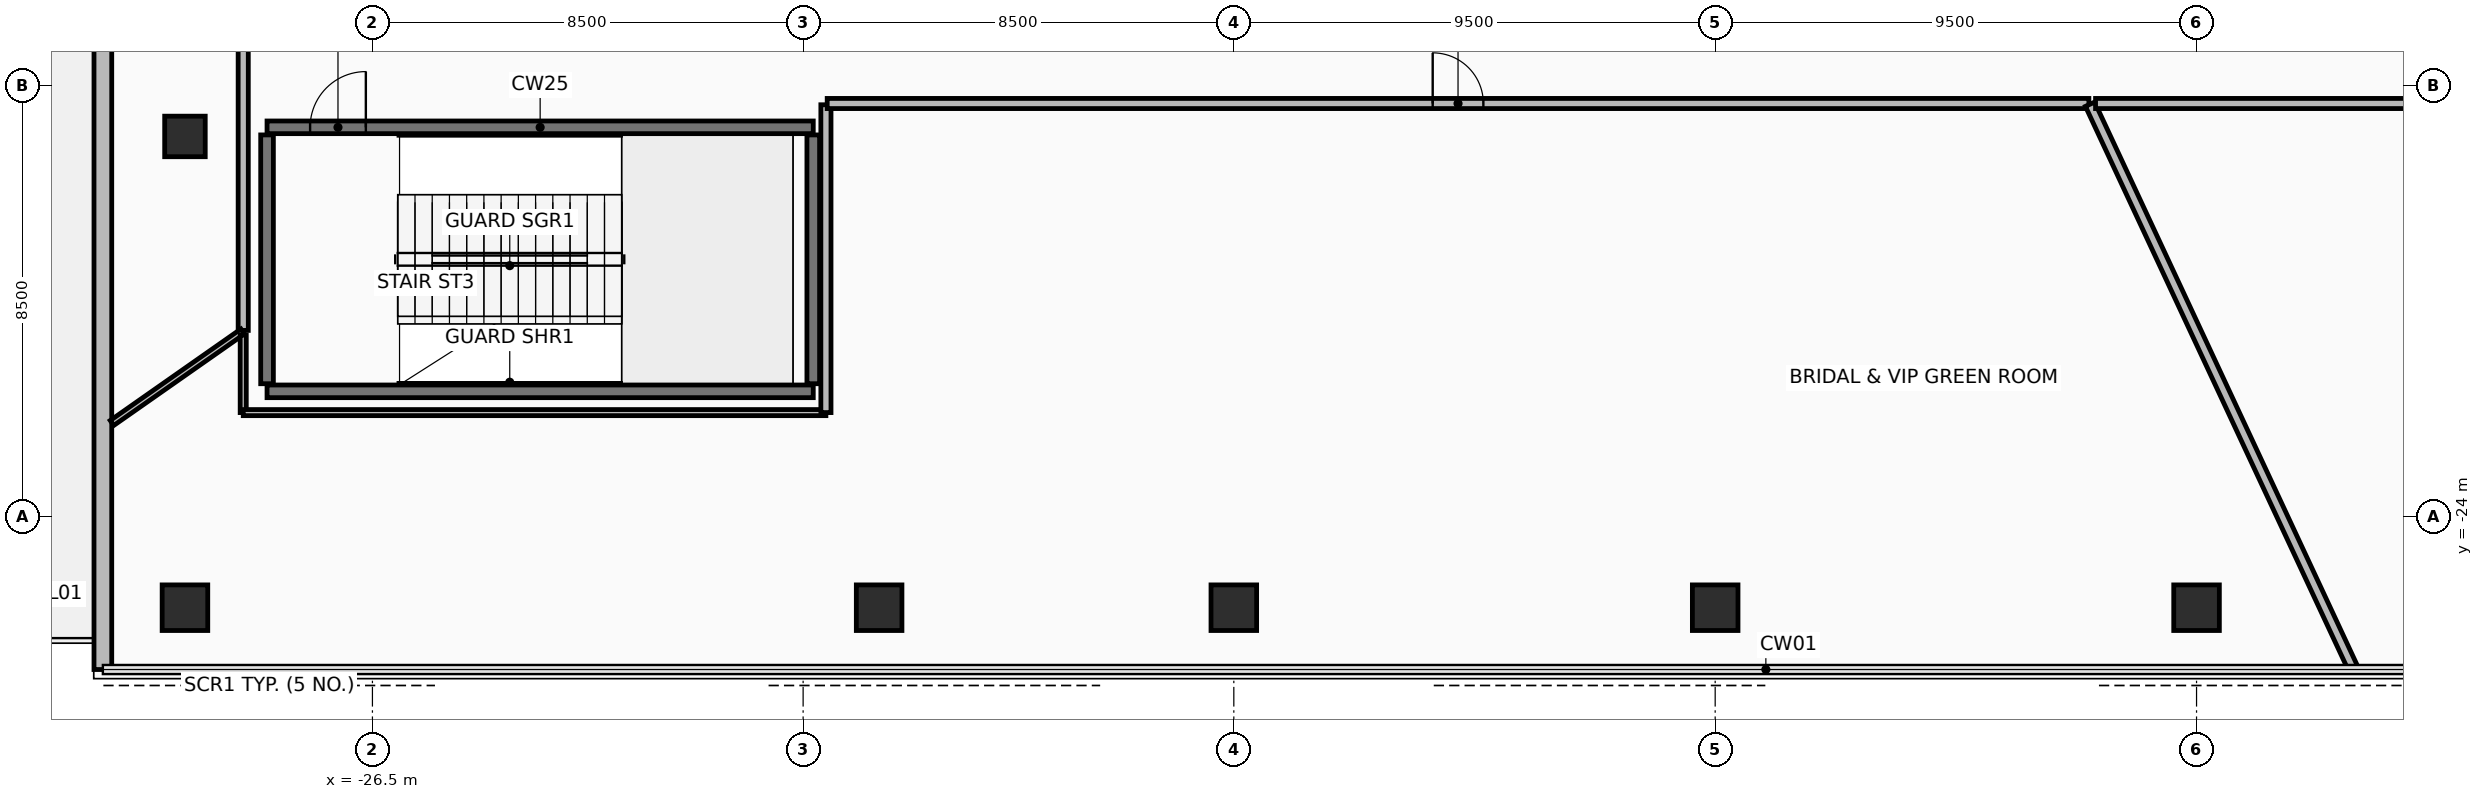
"""IFC4 building model, lengths in metres.
Left out: names, types, materials, properties, quantities, classifications, styles, units other than length and angle.
Written with IfcOpenShell. Run it as: python <this file> out.ifc"""

import sys

from ifc_helpers import new_model, si_unit, direction, frame, frame_2d, origin, origin_2d, place, context, subcontext, project, spatial, rectangle, hollow_rectangle, extrude, element, fill, save


model = new_model("IFC4")
c1 = context("Model", 3, precision=1e-05, world=origin(), true_north=direction((0.0, 1.0)))
c2 = subcontext(c1, "Body", "Model", "MODEL_VIEW")
j1 = project(units=[si_unit("LENGTHUNIT", "METRE"), si_unit("PLANEANGLEUNIT", "RADIAN")], contexts=[c1])
p1 = place(None, origin())
s1 = spatial("IfcSite", under=j1, at=p1, CompositionType="ELEMENT")
p2 = place(p1, origin())
s2 = spatial("IfcBuilding", under=s1, at=p2, CompositionType="ELEMENT")
p3 = place(p2, frame((0.0, 0.0, 16.5)))
s3 = spatial("IfcBuildingStorey", under=s2, at=p3, CompositionType="ELEMENT", Elevation=16.5)
for number, where, z_axis, x_axis in (
    (1, (-30.2, -25.8, 0.0), (0.0, 0.0, 1.0), (1.0, 0.0, 0.0)),
    (2, (-16.5, -25.8, 0.0), (0.0, 0.0, 1.0), (1.0, 0.0, 0.0)),
    (3, (-9.5, -25.8, 0.0), (0.0, 0.0, 1.0), (1.0, 0.0, 0.0)),
    (4, (0.0, -25.8, 0.0), (0.0, 0.0, 1.0), (1.0, 0.0, 0.0)),
    (5, (9.5, -25.8, 0.0), (0.0, 0.0, 1.0), (1.0, 0.0, 0.0)),
):
    element("IfcColumn", number, at=place(p3, frame(where, z_axis=z_axis, x_axis=x_axis)), inside=s3, PredefinedType="COLUMN", context=c2, shape_type="SweptSolid", body=[
        extrude(hollow_rectangle(XDim=0.9, YDim=0.9, WallThickness=0.05, at=origin_2d()), origin(), (0.0, 0.0, 1.0), 5.0),
    ])
p4 = place(p3, frame((-30.2, -16.5, 0.0), z_axis=(0.0, 0.0, 1.0), x_axis=(1.0, 0.0, 0.0)))
e6 = element("IfcColumn", 6, at=p4, inside=s3, PredefinedType="COLUMN", context=c2, shape_type="SweptSolid", body=[
    extrude(hollow_rectangle(XDim=0.8, YDim=0.8, WallThickness=0.045, at=origin_2d()), origin(), (0.0, 0.0, 1.0), 5.0),
])
p5 = place(p3, frame((-31.82, 26.62, 0.0), z_axis=(0.0, 0.0, 1.0), x_axis=(0.0, -1.0, 0.0)))
e7 = element("IfcWall", 7, at=p5, inside=s3, PredefinedType="STANDARD", context=c2, shape_type="SweptSolid", body=[
    extrude(rectangle(XDim=53.64, YDim=0.35, at=frame_2d((26.82, 0.0))), origin(), (0.0, 0.0, 1.0), 4.74),
])
p6 = place(p5, frame((29.8, 0.0, 0.0)))
e8 = element("IfcOpeningElement", 8, at=p6, cuts=e7, PredefinedType="OPENING", context=c2, shape_type="SweptSolid", body=[
    extrude(rectangle(XDim=1.8, YDim=2.3, at=frame_2d((0.9, 1.15))), frame((0.0, 0.185, 0.0), z_axis=(0.0, -1.0, 0.0), x_axis=(1.0, 0.0, 0.0)), (0.0, 0.0, 1.0), 0.37),
])
p7 = place(p5, frame((12.51, 0.0, 0.95)))
e9 = element("IfcOpeningElement", 9, at=p7, cuts=e7, PredefinedType="OPENING", context=c2, shape_type="SweptSolid", body=[
    extrude(rectangle(XDim=1.8, YDim=2.2, at=frame_2d((0.9, 1.1))), frame((0.0, 0.185, 0.0), z_axis=(0.0, -1.0, 0.0), x_axis=(1.0, 0.0, 0.0)), (0.0, 0.0, 1.0), 0.37),
])
p8 = place(p5, frame((25.92, 0.0, 0.95)))
e10 = element("IfcOpeningElement", 10, at=p8, cuts=e7, PredefinedType="OPENING", context=c2, shape_type="SweptSolid", body=[
    extrude(rectangle(XDim=1.8, YDim=2.2, at=frame_2d((0.9, 1.1))), frame((0.0, 0.185, 0.0), z_axis=(0.0, -1.0, 0.0), x_axis=(1.0, 0.0, 0.0)), (0.0, 0.0, 1.0), 0.37),
])
p9 = place(p5, frame((39.33, 0.0, 0.95)))
e11 = element("IfcOpeningElement", 11, at=p9, cuts=e7, PredefinedType="OPENING", context=c2, shape_type="SweptSolid", body=[
    extrude(rectangle(XDim=1.8, YDim=2.2, at=frame_2d((0.9, 1.1))), frame((0.0, 0.185, 0.0), z_axis=(0.0, -1.0, 0.0), x_axis=(1.0, 0.0, 0.0)), (0.0, 0.0, 1.0), 0.37),
])
p10 = place(p3, frame((-28.58, -16.32, 0.0), z_axis=(0.0, 0.0, 1.0), x_axis=(1.0, 0.0, 0.0)))
e12 = element("IfcWall", 12, at=p10, inside=s3, PredefinedType="SHEAR", context=c2, shape_type="SweptSolid", body=[
    extrude(rectangle(XDim=10.78, YDim=0.25, at=frame_2d((5.39, 0.0))), origin(), (0.0, 0.0, 1.0), 4.74),
])
p11 = place(p10, frame((0.85, 0.0, 0.0)))
e13 = element("IfcOpeningElement", 13, at=p11, cuts=e12, PredefinedType="OPENING", context=c2, shape_type="SweptSolid", body=[
    extrude(rectangle(XDim=1.1, YDim=2.15, at=frame_2d((0.55, 1.075))), frame((0.0, 0.135, 0.0), z_axis=(0.0, -1.0, 0.0), x_axis=(1.0, 0.0, 0.0)), (0.0, 0.0, 1.0), 0.27),
])
p12 = place(p3, frame((-28.58, -21.53, 0.0), z_axis=(0.0, 0.0, 1.0), x_axis=(1.0, 0.0, 0.0)))
e14 = element("IfcWall", 14, at=p12, inside=s3, PredefinedType="SHEAR", context=c2, shape_type="SweptSolid", body=[
    extrude(rectangle(XDim=10.78, YDim=0.25, at=frame_2d((5.39, 0.0))), origin(), (0.0, 0.0, 1.0), 4.74),
])
for number, where, z_axis, x_axis in (
    (15, (-28.58, -21.38, 0.0), (0.0, 0.0, 1.0), (0.0, 1.0, 0.0)),
    (16, (-17.8, -21.38, 0.0), (0.0, 0.0, 1.0), (0.0, 1.0, 0.0)),
):
    element("IfcWall", number, at=place(p3, frame(where, z_axis=z_axis, x_axis=x_axis)), inside=s3, PredefinedType="SHEAR", context=c2, shape_type="SweptSolid", body=[
        extrude(rectangle(XDim=4.91, YDim=0.25, at=frame_2d((2.455, 0.0))), origin(), (0.0, 0.0, 1.0), 4.74),
    ])
p13 = place(p3, frame((-29.05, -12.201, 0.0), z_axis=(0.0, 0.0, 1.0), x_axis=(0.0, -1.0, 0.0)))
e17 = element("IfcWall", 17, at=p13, inside=s3, PredefinedType="PARTITIONING", context=c2, shape_type="SweptSolid", body=[
    extrude(rectangle(XDim=8.127, YDim=0.2, at=frame_2d((4.063, 0.0))), origin(), (0.0, 0.0, 1.0), 4.285),
])
p14 = place(p3, frame((-29.061, -20.348, 0.0), z_axis=(0.0, 0.0, 1.0), x_axis=(-0.819115335844, -0.573628857873, 0.0)))
e18 = element("IfcWall", 18, at=p14, inside=s3, PredefinedType="PARTITIONING", context=c2, shape_type="SweptSolid", body=[
    extrude(rectangle(XDim=3.149, YDim=0.12, at=frame_2d((1.574, 0.0))), origin(), (0.0, 0.0, 1.0), 3.935),
])
p15 = place(p3, frame((-29.05, -20.42, 0.0), z_axis=(0.0, 0.0, 1.0), x_axis=(0.0, -1.0, 0.0)))
e19 = element("IfcWall", 19, at=p15, inside=s3, PredefinedType="PARTITIONING", context=c2, shape_type="SweptSolid", body=[
    extrude(rectangle(XDim=1.529, YDim=0.12, at=frame_2d((0.765, 0.0))), origin(), (0.0, 0.0, 1.0), 4.74),
])
p16 = place(p3, frame((-29.049, -21.95, 0.0), z_axis=(0.0, 0.0, 1.0), x_axis=(1.0, 0.0, 0.0)))
e20 = element("IfcWall", 20, at=p16, inside=s3, PredefinedType="PARTITIONING", context=c2, shape_type="SweptSolid", body=[
    extrude(rectangle(XDim=11.499, YDim=0.12, at=frame_2d((5.75, 0.0))), origin(), (0.0, 0.0, 1.0), 4.74),
])
p17 = place(p3, frame((-17.55, -21.949, 0.0), z_axis=(0.0, 0.0, 1.0), x_axis=(0.0, 1.0, 0.0)))
e21 = element("IfcWall", 21, at=p17, inside=s3, PredefinedType="PARTITIONING", context=c2, shape_type="SweptSolid", body=[
    extrude(rectangle(XDim=6.074, YDim=0.2, at=frame_2d((3.037, 0.0))), origin(), (0.0, 0.0, 1.0), 4.74),
])
p18 = place(p3, frame((-17.525, -15.85, 0.0), z_axis=(0.0, 0.0, 1.0), x_axis=(1.0, 0.0, 0.0)))
e22 = element("IfcWall", 22, at=p18, inside=s3, PredefinedType="PARTITIONING", context=c2, shape_type="SweptSolid", body=[
    extrude(rectangle(XDim=24.9, YDim=0.2, at=frame_2d((12.45, 0.0))), origin(), (0.0, 0.0, 1.0), 2.935),
])
p19 = place(p18, frame((11.95, 0.0, 0.0)))
e23 = element("IfcOpeningElement", 23, at=p19, cuts=e22, PredefinedType="OPENING", context=c2, shape_type="SweptSolid", body=[
    extrude(rectangle(XDim=1.0, YDim=2.15, at=frame_2d((0.5, 1.075))), frame((0.0, 0.11, 0.0), z_axis=(0.0, -1.0, 0.0), x_axis=(1.0, 0.0, 0.0)), (0.0, 0.0, 1.0), 0.22),
])
p20 = place(p3, frame((7.398, -15.865, 0.0), z_axis=(0.0, 0.0, 1.0), x_axis=(0.422618329775, -0.906307755312, 0.0)))
e24 = element("IfcWall", 24, at=p20, inside=s3, PredefinedType="PARTITIONING", context=c2, shape_type="SweptSolid", body=[
    extrude(rectangle(XDim=12.309, YDim=0.2, at=frame_2d((6.154, 0.0))), origin(), (0.0, 0.0, 1.0), 3.135),
])
p21 = place(p3, frame((7.507, -15.85, 0.0), z_axis=(0.0, 0.0, 1.0), x_axis=(1.0, 0.0, 0.0)))
e25 = element("IfcWall", 25, at=p21, inside=s3, PredefinedType="PARTITIONING", context=c2, shape_type="SweptSolid", body=[
    extrude(rectangle(XDim=10.042, YDim=0.2, at=frame_2d((5.021, 0.0))), origin(), (0.0, 0.0, 1.0), 2.935),
])
p22 = place(p11, frame((1.1, 0.0, 0.0), z_axis=(0.0, 0.0, 1.0), x_axis=(-1.0, 0.0, 0.0)))
e26 = element("IfcDoor", 26, at=p22, inside=s3, OperationType="SINGLE_SWING_LEFT", PredefinedType="DOOR", context=c2, shape_type="SweptSolid", body=[
    extrude(rectangle(XDim=1.1, YDim=2.15, at=frame_2d((0.55, 1.075))), frame((0.0, 0.025, 0.0), z_axis=(0.0, -1.0, 0.0), x_axis=(1.0, 0.0, 0.0)), (0.0, 0.0, 1.0), 0.05),
])
fill(e13, e26)
p23 = place(p19, origin())
e27 = element("IfcDoor", 27, at=p23, inside=s3, OperationType="SINGLE_SWING_RIGHT", PredefinedType="DOOR", context=c2, shape_type="SweptSolid", body=[
    extrude(rectangle(XDim=1.0, YDim=2.15, at=frame_2d((0.5, 1.075))), frame((0.0, 0.025, 0.0), z_axis=(0.0, -1.0, 0.0), x_axis=(1.0, 0.0, 0.0)), (0.0, 0.0, 1.0), 0.05),
])
fill(e23, e27)
save(model, sys.argv[1])
